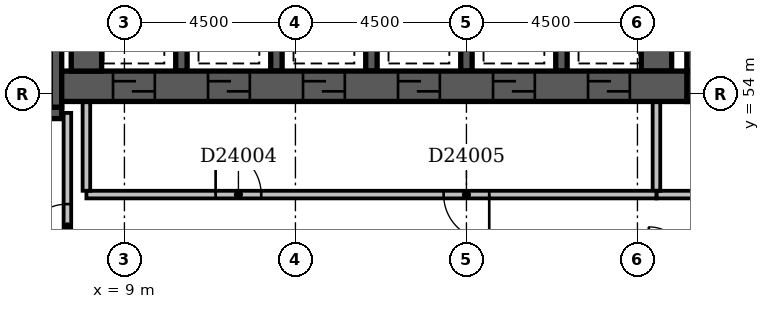
"""IFC4 building model, lengths in metres.
Left out: names, types, materials, properties, quantities, classifications, styles, units other than length and angle.
Written with IfcOpenShell. Run it as: python <this file> out.ifc"""

import sys

from ifc_helpers import new_model, si_unit, direction, frame, frame_2d, origin, place, context, subcontext, project, spatial, rectangle, extrude, element, fill, save


model = new_model("IFC4")
c1 = context("Model", 3, precision=1e-05, world=origin(), true_north=direction((0.0, 1.0)))
c2 = subcontext(c1, "Body", "Model", "MODEL_VIEW")
j1 = project(units=[si_unit("LENGTHUNIT", "METRE"), si_unit("PLANEANGLEUNIT", "RADIAN")], contexts=[c1])
p1 = place(None, origin())
s1 = spatial("IfcSite", under=j1, at=p1, CompositionType="ELEMENT")
p2 = place(p1, origin())
s2 = spatial("IfcBuilding", under=s1, at=p2, CompositionType="ELEMENT")
p3 = place(p2, frame((0.0, 0.0, 97.4)))
s3 = spatial("IfcBuildingStorey", under=s2, at=p3, CompositionType="ELEMENT", Elevation=97.4)
p4 = place(p3, frame((0.35, 53.5, -0.3), z_axis=(0.0, 0.0, 1.0), x_axis=(1.0, 0.0, 0.0)))
e1 = element("IfcWall", 1, at=p4, inside=s3, PredefinedType="SHEAR", context=c2, shape_type="SweptSolid", body=[
    extrude(rectangle(XDim=7.0, YDim=0.3, at=frame_2d((3.5, 0.0))), origin(), (0.0, 0.0, 1.0), 3.6),
])
p5 = place(p4, frame((5.58, 0.0, 0.3)))
e2 = element("IfcOpeningElement", 2, at=p5, cuts=e1, PredefinedType="OPENING", context=c2, shape_type="SweptSolid", body=[
    extrude(rectangle(XDim=1.1, YDim=2.1, at=frame_2d((0.55, 1.05))), frame((0.0, 0.162, 0.0), z_axis=(0.0, -1.0, 0.0), x_axis=(1.0, 0.0, 0.0)), (0.0, 0.0, 1.0), 0.324),
])
p6 = place(p3, frame((7.2, 53.65, -0.3), z_axis=(0.0, 0.0, 1.0), x_axis=(0.0, 1.0, 0.0)))
e3 = element("IfcWall", 3, at=p6, inside=s3, PredefinedType="SHEAR", context=c2, shape_type="SweptSolid", body=[
    extrude(rectangle(XDim=4.2, YDim=0.3, at=frame_2d((2.1, 0.0))), origin(), (0.0, 0.0, 1.0), 3.6),
])
p7 = place(p3, frame((7.35, 54.2, -0.3), z_axis=(0.0, 0.0, 1.0), x_axis=(1.0, 0.0, 0.0)))
e4 = element("IfcWall", 4, at=p7, inside=s3, PredefinedType="SHEAR", context=c2, shape_type="SweptSolid", body=[
    extrude(rectangle(XDim=16.45, YDim=0.8, at=frame_2d((8.225, 0.0))), origin(), (0.0, 0.0, 1.0), 3.6),
])
p8 = place(p7, frame((1.35, 0.0, 0.3)))
e5 = element("IfcOpeningElement", 5, at=p8, cuts=e4, PredefinedType="OPENING", context=c2, shape_type="SweptSolid", body=[
    extrude(rectangle(XDim=1.1, YDim=2.1, at=frame_2d((0.55, 1.05))), frame((0.0, 0.412, 0.0), z_axis=(0.0, -1.0, 0.0), x_axis=(1.0, 0.0, 0.0)), (0.0, 0.0, 1.0), 0.824),
])
p9 = place(p7, frame((3.85, 0.0, 0.3)))
e6 = element("IfcOpeningElement", 6, at=p9, cuts=e4, PredefinedType="OPENING", context=c2, shape_type="SweptSolid", body=[
    extrude(rectangle(XDim=1.1, YDim=2.1, at=frame_2d((0.55, 1.05))), frame((0.0, 0.412, 0.0), z_axis=(0.0, -1.0, 0.0), x_axis=(1.0, 0.0, 0.0)), (0.0, 0.0, 1.0), 0.824),
])
p10 = place(p7, frame((6.35, 0.0, 0.3)))
e7 = element("IfcOpeningElement", 7, at=p10, cuts=e4, PredefinedType="OPENING", context=c2, shape_type="SweptSolid", body=[
    extrude(rectangle(XDim=1.1, YDim=2.1, at=frame_2d((0.55, 1.05))), frame((0.0, 0.412, 0.0), z_axis=(0.0, -1.0, 0.0), x_axis=(1.0, 0.0, 0.0)), (0.0, 0.0, 1.0), 0.824),
])
p11 = place(p7, frame((8.85, 0.0, 0.3)))
e8 = element("IfcOpeningElement", 8, at=p11, cuts=e4, PredefinedType="OPENING", context=c2, shape_type="SweptSolid", body=[
    extrude(rectangle(XDim=1.1, YDim=2.1, at=frame_2d((0.55, 1.05))), frame((0.0, 0.412, 0.0), z_axis=(0.0, -1.0, 0.0), x_axis=(1.0, 0.0, 0.0)), (0.0, 0.0, 1.0), 0.824),
])
p12 = place(p7, frame((11.35, 0.0, 0.3)))
e9 = element("IfcOpeningElement", 9, at=p12, cuts=e4, PredefinedType="OPENING", context=c2, shape_type="SweptSolid", body=[
    extrude(rectangle(XDim=1.1, YDim=2.1, at=frame_2d((0.55, 1.05))), frame((0.0, 0.412, 0.0), z_axis=(0.0, -1.0, 0.0), x_axis=(1.0, 0.0, 0.0)), (0.0, 0.0, 1.0), 0.824),
])
p13 = place(p7, frame((13.85, 0.0, 0.3)))
e10 = element("IfcOpeningElement", 10, at=p13, cuts=e4, PredefinedType="OPENING", context=c2, shape_type="SweptSolid", body=[
    extrude(rectangle(XDim=1.1, YDim=2.1, at=frame_2d((0.55, 1.05))), frame((0.0, 0.412, 0.0), z_axis=(0.0, -1.0, 0.0), x_axis=(1.0, 0.0, 0.0)), (0.0, 0.0, 1.0), 0.824),
])
p14 = place(p3, frame((8.0, 54.6, -0.3), z_axis=(0.0, 0.0, 1.0), x_axis=(0.0, 1.0, 0.0)))
e11 = element("IfcWall", 11, at=p14, inside=s3, PredefinedType="SHEAR", context=c2, shape_type="SweptSolid", body=[
    extrude(rectangle(XDim=3.0, YDim=0.8, at=frame_2d((1.5, 0.0))), origin(), (0.0, 0.0, 1.0), 3.6),
])
for number, where, z_axis, x_axis in (
    (12, (10.5, 54.6, -0.3), (0.0, 0.0, 1.0), (0.0, 1.0, 0.0)),
    (13, (13.0, 54.6, -0.3), (0.0, 0.0, 1.0), (0.0, 1.0, 0.0)),
    (14, (15.5, 54.6, -0.3), (0.0, 0.0, 1.0), (0.0, 1.0, 0.0)),
    (15, (18.0, 54.6, -0.3), (0.0, 0.0, 1.0), (0.0, 1.0, 0.0)),
    (16, (20.5, 54.6, -0.3), (0.0, 0.0, 1.0), (0.0, 1.0, 0.0)),
):
    element("IfcWall", number, at=place(p3, frame(where, z_axis=z_axis, x_axis=x_axis)), inside=s3, PredefinedType="SHEAR", context=c2, shape_type="SweptSolid", body=[
        extrude(rectangle(XDim=3.0, YDim=0.3, at=frame_2d((1.5, 0.0))), origin(), (0.0, 0.0, 1.0), 3.6),
    ])
p15 = place(p3, frame((23.0, 54.6, -0.3), z_axis=(0.0, 0.0, 1.0), x_axis=(0.0, 1.0, 0.0)))
e17 = element("IfcWall", 17, at=p15, inside=s3, PredefinedType="SHEAR", context=c2, shape_type="SweptSolid", body=[
    extrude(rectangle(XDim=3.0, YDim=0.8, at=frame_2d((1.5, 0.0))), origin(), (0.0, 0.0, 1.0), 3.6),
])
p16 = place(p3, frame((23.8, 54.2, -0.3), z_axis=(0.0, 0.0, 1.0), x_axis=(1.0, 0.0, 0.0)))
e18 = element("IfcWall", 18, at=p16, inside=s3, PredefinedType="SHEAR", context=c2, shape_type="SweptSolid", body=[
    extrude(rectangle(XDim=3.3, YDim=0.8, at=frame_2d((1.65, 0.0))), origin(), (0.0, 0.0, 1.0), 3.6),
])
p17 = place(p16, frame((1.1, 0.0, 0.3)))
e19 = element("IfcOpeningElement", 19, at=p17, cuts=e18, PredefinedType="OPENING", context=c2, shape_type="SweptSolid", body=[
    extrude(rectangle(XDim=1.1, YDim=2.1, at=frame_2d((0.55, 1.05))), frame((0.0, 0.412, 0.0), z_axis=(0.0, -1.0, 0.0), x_axis=(1.0, 0.0, 0.0)), (0.0, 0.0, 1.0), 0.824),
])
p18 = place(p3, frame((24.2, 54.6, -0.3), z_axis=(0.0, 0.0, 1.0), x_axis=(0.0, 1.0, 0.0)))
e20 = element("IfcWall", 20, at=p18, inside=s3, PredefinedType="SHEAR", context=c2, shape_type="SweptSolid", body=[
    extrude(rectangle(XDim=3.0, YDim=0.8, at=frame_2d((1.5, 0.0))), origin(), (0.0, 0.0, 1.0), 3.6),
])
p19 = place(p3, frame((8.0, 51.35, 0.0), z_axis=(0.0, 0.0, 1.0), x_axis=(1.0, 0.0, 0.0)))
e21 = element("IfcWall", 21, at=p19, inside=s3, PredefinedType="PARTITIONING", context=c2, shape_type="SweptSolid", body=[
    extrude(rectangle(XDim=15.0, YDim=0.2, at=frame_2d((7.5, 0.0))), origin(), (0.0, 0.0, 1.0), 3.3),
])
p20 = place(p19, frame((3.4, 0.0, 0.0)))
e22 = element("IfcOpeningElement", 22, at=p20, cuts=e21, PredefinedType="OPENING", context=c2, shape_type="SweptSolid", body=[
    extrude(rectangle(XDim=1.2, YDim=2.1, at=frame_2d((0.6, 1.05))), frame((0.0, 0.112, 0.0), z_axis=(0.0, -1.0, 0.0), x_axis=(1.0, 0.0, 0.0)), (0.0, 0.0, 1.0), 0.224),
])
p21 = place(p19, frame((9.4, 0.0, 0.0)))
e23 = element("IfcOpeningElement", 23, at=p21, cuts=e21, PredefinedType="OPENING", context=c2, shape_type="SweptSolid", body=[
    extrude(rectangle(XDim=1.2, YDim=2.1, at=frame_2d((0.6, 1.05))), frame((0.0, 0.112, 0.0), z_axis=(0.0, -1.0, 0.0), x_axis=(1.0, 0.0, 0.0)), (0.0, 0.0, 1.0), 0.224),
])
for number, where, z_axis, x_axis in (
    (24, (23.0, 51.45, 0.0), (0.0, 0.0, 1.0), (0.0, 1.0, 0.0)),
    (25, (8.0, 51.45, 0.0), (0.0, 0.0, 1.0), (0.0, 1.0, 0.0)),
):
    element("IfcWall", number, at=place(p3, frame(where, z_axis=z_axis, x_axis=x_axis)), inside=s3, PredefinedType="PARTITIONING", context=c2, shape_type="SweptSolid", body=[
        extrude(rectangle(XDim=2.33, YDim=0.2, at=frame_2d((1.165, 0.0))), origin(), (0.0, 0.0, 1.0), 3.3),
    ])
p22 = place(p3, frame((23.0, 51.35, 0.0), z_axis=(0.0, 0.0, 1.0), x_axis=(1.0, 0.0, 0.0)))
e26 = element("IfcWall", 26, at=p22, inside=s3, PredefinedType="PARTITIONING", context=c2, shape_type="SweptSolid", body=[
    extrude(rectangle(XDim=4.8, YDim=0.2, at=frame_2d((2.4, 0.0))), origin(), (0.0, 0.0, 1.0), 3.3),
])
p23 = place(p22, frame((1.65, 0.0, 0.0)))
e27 = element("IfcOpeningElement", 27, at=p23, cuts=e26, PredefinedType="OPENING", context=c2, shape_type="SweptSolid", body=[
    extrude(rectangle(XDim=1.2, YDim=2.1, at=frame_2d((0.6, 1.05))), frame((0.0, 0.112, 0.0), z_axis=(0.0, -1.0, 0.0), x_axis=(1.0, 0.0, 0.0)), (0.0, 0.0, 1.0), 0.224),
])
p24 = place(p3, frame((7.5, 49.6, 0.0), z_axis=(0.0, 0.0, 1.0), x_axis=(0.0, 1.0, 0.0)))
e28 = element("IfcWall", 28, at=p24, inside=s3, PredefinedType="PARTITIONING", context=c2, shape_type="SweptSolid", body=[
    extrude(rectangle(XDim=3.9, YDim=0.2, at=frame_2d((1.95, 0.0))), origin(), (0.0, 0.0, 1.0), 3.3),
])
p25 = place(p24, frame((0.3, 0.0, 0.0)))
e29 = element("IfcOpeningElement", 29, at=p25, cuts=e28, PredefinedType="OPENING", context=c2, shape_type="SweptSolid", body=[
    extrude(rectangle(XDim=1.2, YDim=2.1, at=frame_2d((0.6, 1.05))), frame((0.0, 0.112, 0.0), z_axis=(0.0, -1.0, 0.0), x_axis=(1.0, 0.0, 0.0)), (0.0, 0.0, 1.0), 0.224),
])
p26 = place(p25, origin())
e30 = element("IfcDoor", 30, at=p26, inside=s3, OperationType="SINGLE_SWING_LEFT", PredefinedType="DOOR", context=c2, shape_type="SweptSolid", body=[
    extrude(rectangle(XDim=1.2, YDim=2.1, at=frame_2d((0.6, 1.05))), frame((0.0, 0.025, 0.0), z_axis=(0.0, -1.0, 0.0), x_axis=(1.0, 0.0, 0.0)), (0.0, 0.0, 1.0), 0.05),
])
fill(e29, e30)
p27 = place(p8, origin())
e31 = element("IfcDoor", 31, at=p27, inside=s3, OperationType="SLIDING_TO_LEFT", PredefinedType="DOOR", context=c2, shape_type="SweptSolid", body=[
    extrude(rectangle(XDim=1.1, YDim=2.1, at=frame_2d((0.55, 1.05))), frame((0.0, 0.025, 0.0), z_axis=(0.0, -1.0, 0.0), x_axis=(1.0, 0.0, 0.0)), (0.0, 0.0, 1.0), 0.05),
])
fill(e5, e31)
p28 = place(p9, origin())
e32 = element("IfcDoor", 32, at=p28, inside=s3, OperationType="SLIDING_TO_LEFT", PredefinedType="DOOR", context=c2, shape_type="SweptSolid", body=[
    extrude(rectangle(XDim=1.1, YDim=2.1, at=frame_2d((0.55, 1.05))), frame((0.0, 0.025, 0.0), z_axis=(0.0, -1.0, 0.0), x_axis=(1.0, 0.0, 0.0)), (0.0, 0.0, 1.0), 0.05),
])
fill(e6, e32)
p29 = place(p10, origin())
e33 = element("IfcDoor", 33, at=p29, inside=s3, OperationType="SLIDING_TO_LEFT", PredefinedType="DOOR", context=c2, shape_type="SweptSolid", body=[
    extrude(rectangle(XDim=1.1, YDim=2.1, at=frame_2d((0.55, 1.05))), frame((0.0, 0.025, 0.0), z_axis=(0.0, -1.0, 0.0), x_axis=(1.0, 0.0, 0.0)), (0.0, 0.0, 1.0), 0.05),
])
fill(e7, e33)
p30 = place(p11, origin())
e34 = element("IfcDoor", 34, at=p30, inside=s3, OperationType="SLIDING_TO_LEFT", PredefinedType="DOOR", context=c2, shape_type="SweptSolid", body=[
    extrude(rectangle(XDim=1.1, YDim=2.1, at=frame_2d((0.55, 1.05))), frame((0.0, 0.025, 0.0), z_axis=(0.0, -1.0, 0.0), x_axis=(1.0, 0.0, 0.0)), (0.0, 0.0, 1.0), 0.05),
])
fill(e8, e34)
p31 = place(p12, origin())
e35 = element("IfcDoor", 35, at=p31, inside=s3, OperationType="SLIDING_TO_LEFT", PredefinedType="DOOR", context=c2, shape_type="SweptSolid", body=[
    extrude(rectangle(XDim=1.1, YDim=2.1, at=frame_2d((0.55, 1.05))), frame((0.0, 0.025, 0.0), z_axis=(0.0, -1.0, 0.0), x_axis=(1.0, 0.0, 0.0)), (0.0, 0.0, 1.0), 0.05),
])
fill(e9, e35)
p32 = place(p13, origin())
e36 = element("IfcDoor", 36, at=p32, inside=s3, OperationType="SLIDING_TO_LEFT", PredefinedType="DOOR", context=c2, shape_type="SweptSolid", body=[
    extrude(rectangle(XDim=1.1, YDim=2.1, at=frame_2d((0.55, 1.05))), frame((0.0, 0.025, 0.0), z_axis=(0.0, -1.0, 0.0), x_axis=(1.0, 0.0, 0.0)), (0.0, 0.0, 1.0), 0.05),
])
fill(e10, e36)
p33 = place(p20, origin())
e37 = element("IfcDoor", 37, at=p33, inside=s3, OperationType="SINGLE_SWING_LEFT", PredefinedType="DOOR", context=c2, shape_type="SweptSolid", body=[
    extrude(rectangle(XDim=1.2, YDim=2.1, at=frame_2d((0.6, 1.05))), frame((0.0, 0.025, 0.0), z_axis=(0.0, -1.0, 0.0), x_axis=(1.0, 0.0, 0.0)), (0.0, 0.0, 1.0), 0.05),
])
fill(e22, e37)
p34 = place(p21, origin())
e38 = element("IfcDoor", 38, at=p34, inside=s3, OperationType="SINGLE_SWING_RIGHT", PredefinedType="DOOR", context=c2, shape_type="SweptSolid", body=[
    extrude(rectangle(XDim=1.2, YDim=2.1, at=frame_2d((0.6, 1.05))), frame((0.0, 0.025, 0.0), z_axis=(0.0, -1.0, 0.0), x_axis=(1.0, 0.0, 0.0)), (0.0, 0.0, 1.0), 0.05),
])
fill(e23, e38)
save(model, sys.argv[1])
